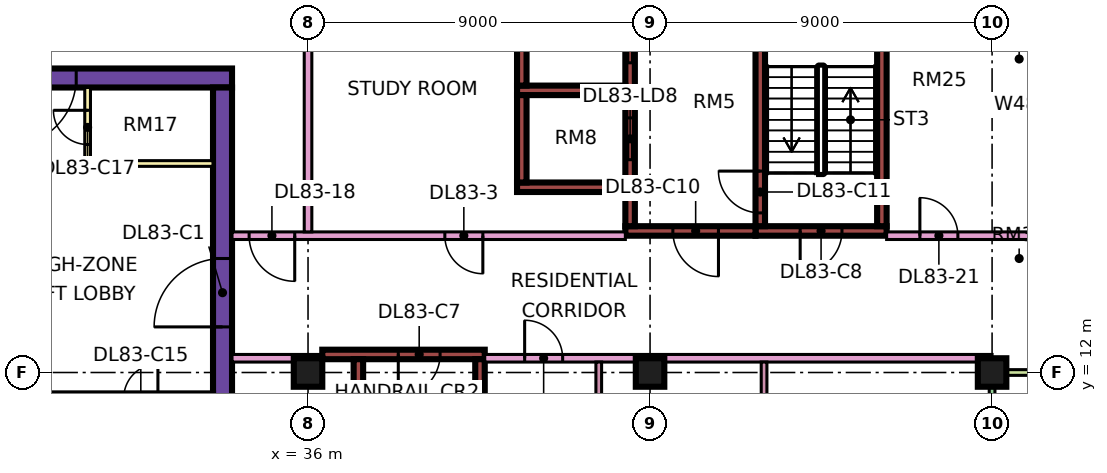
"""IFC4 building model, lengths in metres.
Left out: names, types, materials, properties, quantities, classifications, styles, units other than length and angle.
Written with IfcOpenShell. Run it as: python <this file> out.ifc"""

import sys

from ifc_helpers import new_model, si_unit, direction, frame, frame_2d, origin, origin_2d, place, context, subcontext, project, spatial, rectangle, extrude, element, fill, save


model = new_model("IFC4")
c1 = context("Model", 3, precision=1e-05, world=origin(), true_north=direction((0.0, 1.0)))
c2 = subcontext(c1, "Body", "Model", "MODEL_VIEW")
j1 = project(units=[si_unit("LENGTHUNIT", "METRE"), si_unit("PLANEANGLEUNIT", "RADIAN")], contexts=[c1])
p1 = place(None, origin())
s1 = spatial("IfcSite", under=j1, at=p1, CompositionType="ELEMENT")
p2 = place(p1, origin())
s2 = spatial("IfcBuilding", under=s1, at=p2, CompositionType="ELEMENT")
p3 = place(p2, frame((0.0, 0.0, 357.65)))
s3 = spatial("IfcBuildingStorey", under=s2, at=p3, CompositionType="ELEMENT", Elevation=357.65)
for number, where, z_axis, x_axis in (
    (1, (36.0, 12.0, 0.0), (0.0, 0.0, 1.0), (1.0, 0.0, 0.0)),
    (2, (45.0, 12.0, 0.0), (0.0, 0.0, 1.0), (1.0, 0.0, 0.0)),
    (3, (54.0, 12.0, 0.0), (0.0, 0.0, 1.0), (1.0, 0.0, 0.0)),
):
    element("IfcColumn", number, at=place(p3, frame(where, z_axis=z_axis, x_axis=x_axis)), inside=s3, PredefinedType="COLUMN", context=c2, shape_type="SweptSolid", body=[
        extrude(rectangle(XDim=0.75, YDim=0.75, at=origin_2d()), origin(), (0.0, 0.0, 1.0), 3.75),
    ])
p4 = place(p3, frame((9.0, 19.75, 0.0), z_axis=(0.0, 0.0, 1.0), x_axis=(1.0, 0.0, 0.0)))
e4 = element("IfcWall", 4, at=p4, inside=s3, PredefinedType="SHEAR", context=c2, shape_type="SweptSolid", body=[
    extrude(rectangle(XDim=25.0, YDim=0.5, at=frame_2d((12.5, 0.0))), origin(), (0.0, 0.0, 1.0), 3.75),
])
p5 = place(p4, frame((19.1, 0.0, 0.0)))
e5 = element("IfcOpeningElement", 5, at=p5, cuts=e4, PredefinedType="OPENING", context=c2, shape_type="SweptSolid", body=[
    extrude(rectangle(XDim=1.8, YDim=2.4, at=frame_2d((0.9, 1.2))), frame((0.0, 0.26, 0.0), z_axis=(0.0, -1.0, 0.0), x_axis=(1.0, 0.0, 0.0)), (0.0, 0.0, 1.0), 0.52),
])
p6 = place(p3, frame((33.75, 7.5, 0.0), z_axis=(0.0, 0.0, 1.0), x_axis=(0.0, 1.0, 0.0)))
e6 = element("IfcWall", 6, at=p6, inside=s3, PredefinedType="SHEAR", context=c2, shape_type="SweptSolid", body=[
    extrude(rectangle(XDim=12.0, YDim=0.5, at=frame_2d((6.0, 0.0))), origin(), (0.0, 0.0, 1.0), 3.75),
])
p7 = place(p6, frame((5.7, 0.0, 0.0)))
e7 = element("IfcOpeningElement", 7, at=p7, cuts=e6, PredefinedType="OPENING", context=c2, shape_type="SweptSolid", body=[
    extrude(rectangle(XDim=1.8, YDim=2.4, at=frame_2d((0.9, 1.2))), frame((0.0, 0.26, 0.0), z_axis=(0.0, -1.0, 0.0), x_axis=(1.0, 0.0, 0.0)), (0.0, 0.0, 1.0), 0.52),
])
p8 = place(p3, frame((36.375, 12.475, 0.0), z_axis=(0.0, 0.0, 1.0), x_axis=(1.0, 0.0, 0.0)))
e8 = element("IfcWall", 8, at=p8, inside=s3, PredefinedType="SHEAR", context=c2, shape_type="SweptSolid", body=[
    extrude(rectangle(XDim=4.275, YDim=0.25, at=frame_2d((2.137, 0.0))), origin(), (0.0, 0.0, 1.0), 3.75),
])
p9 = place(p8, frame((2.0, 0.0, 0.0)))
e9 = element("IfcOpeningElement", 9, at=p9, cuts=e8, PredefinedType="OPENING", context=c2, shape_type="SweptSolid", body=[
    extrude(rectangle(XDim=1.1, YDim=2.2, at=frame_2d((0.55, 1.1))), frame((0.0, 0.135, 0.0), z_axis=(0.0, -1.0, 0.0), x_axis=(1.0, 0.0, 0.0)), (0.0, 0.0, 1.0), 0.27),
])
for number, where, z_axis, x_axis in (
    (10, (37.325, 5.85, 0.0), (0.0, 0.0, 1.0), (0.0, 1.0, 0.0)),
    (11, (40.525, 5.85, 0.0), (0.0, 0.0, 1.0), (0.0, 1.0, 0.0)),
):
    element("IfcWall", number, at=place(p3, frame(where, z_axis=z_axis, x_axis=x_axis)), inside=s3, PredefinedType="SHEAR", context=c2, shape_type="SweptSolid", body=[
        extrude(rectangle(XDim=6.5, YDim=0.25, at=frame_2d((3.25, 0.0))), origin(), (0.0, 0.0, 1.0), 3.75),
    ])
p10 = place(p3, frame((47.775, 15.725, 0.0), z_axis=(0.0, 0.0, 1.0), x_axis=(1.0, 0.0, 0.0)))
e12 = element("IfcWall", 12, at=p10, inside=s3, PredefinedType="SHEAR", context=c2, shape_type="SweptSolid", body=[
    extrude(rectangle(XDim=3.45, YDim=0.25, at=frame_2d((1.725, 0.0))), origin(), (0.0, 0.0, 1.0), 3.75),
])
p11 = place(p10, frame((1.175, 0.0, 0.0)))
e13 = element("IfcOpeningElement", 13, at=p11, cuts=e12, PredefinedType="OPENING", context=c2, shape_type="SweptSolid", body=[
    extrude(rectangle(XDim=1.1, YDim=2.2, at=frame_2d((0.55, 1.1))), frame((0.0, 0.135, 0.0), z_axis=(0.0, -1.0, 0.0), x_axis=(1.0, 0.0, 0.0)), (0.0, 0.0, 1.0), 0.27),
])
p12 = place(p3, frame((47.9, 15.85, 0.0), z_axis=(0.0, 0.0, 1.0), x_axis=(0.0, 1.0, 0.0)))
e14 = element("IfcWall", 14, at=p12, inside=s3, PredefinedType="SHEAR", context=c2, shape_type="SweptSolid", body=[
    extrude(rectangle(XDim=6.5, YDim=0.25, at=frame_2d((3.25, 0.0))), origin(), (0.0, 0.0, 1.0), 3.75),
])
p13 = place(p12, frame((0.35, 0.0, 0.0)))
e15 = element("IfcOpeningElement", 15, at=p13, cuts=e14, PredefinedType="OPENING", context=c2, shape_type="SweptSolid", body=[
    extrude(rectangle(XDim=1.1, YDim=2.2, at=frame_2d((0.55, 1.1))), frame((0.0, 0.135, 0.0), z_axis=(0.0, -1.0, 0.0), x_axis=(1.0, 0.0, 0.0)), (0.0, 0.0, 1.0), 0.27),
])
p14 = place(p3, frame((51.1, 15.85, 0.0), z_axis=(0.0, 0.0, 1.0), x_axis=(0.0, 1.0, 0.0)))
e16 = element("IfcWall", 16, at=p14, inside=s3, PredefinedType="SHEAR", context=c2, shape_type="SweptSolid", body=[
    extrude(rectangle(XDim=6.5, YDim=0.25, at=frame_2d((3.25, 0.0))), origin(), (0.0, 0.0, 1.0), 3.75),
])
p15 = place(p3, frame((44.35, 15.725, 0.0), z_axis=(0.0, 0.0, 1.0), x_axis=(1.0, 0.0, 0.0)))
e17 = element("IfcWall", 17, at=p15, inside=s3, PredefinedType="SHEAR", context=c2, shape_type="SweptSolid", body=[
    extrude(rectangle(XDim=3.425, YDim=0.25, at=frame_2d((1.712, 0.0))), origin(), (0.0, 0.0, 1.0), 3.75),
])
p16 = place(p15, frame((1.25, 0.0, 0.0)))
e18 = element("IfcOpeningElement", 18, at=p16, cuts=e17, PredefinedType="OPENING", context=c2, shape_type="SweptSolid", body=[
    extrude(rectangle(XDim=1.2, YDim=2.2, at=frame_2d((0.6, 1.1))), frame((0.0, 0.135, 0.0), z_axis=(0.0, -1.0, 0.0), x_axis=(1.0, 0.0, 0.0)), (0.0, 0.0, 1.0), 0.27),
])
p17 = place(p3, frame((44.475, 15.85, 0.0), z_axis=(0.0, 0.0, 1.0), x_axis=(0.0, 1.0, 0.0)))
e19 = element("IfcWall", 19, at=p17, inside=s3, PredefinedType="SHEAR", context=c2, shape_type="SweptSolid", body=[
    extrude(rectangle(XDim=6.5, YDim=0.25, at=frame_2d((3.25, 0.0))), origin(), (0.0, 0.0, 1.0), 3.75),
])
p18 = place(p17, frame((1.75, 0.0, 0.0)))
e20 = element("IfcOpeningElement", 20, at=p18, cuts=e19, PredefinedType="OPENING", context=c2, shape_type="SweptSolid", body=[
    extrude(rectangle(XDim=1.1, YDim=2.2, at=frame_2d((0.55, 1.1))), frame((0.0, 0.135, 0.0), z_axis=(0.0, -1.0, 0.0), x_axis=(1.0, 0.0, 0.0)), (0.0, 0.0, 1.0), 0.27),
])
p19 = place(p17, frame((4.3, 0.0, 0.0)))
e21 = element("IfcOpeningElement", 21, at=p19, cuts=e19, PredefinedType="OPENING", context=c2, shape_type="SweptSolid", body=[
    extrude(rectangle(XDim=1.1, YDim=2.2, at=frame_2d((0.55, 1.1))), frame((0.0, 0.135, 0.0), z_axis=(0.0, -1.0, 0.0), x_axis=(1.0, 0.0, 0.0)), (0.0, 0.0, 1.0), 0.27),
])
for number, where, z_axis, x_axis in (
    (22, (41.5, 16.875, 0.0), (0.0, 0.0, 1.0), (1.0, 0.0, 0.0)),
    (23, (41.5, 19.425, 0.0), (0.0, 0.0, 1.0), (1.0, 0.0, 0.0)),
):
    element("IfcWall", number, at=place(p3, frame(where, z_axis=z_axis, x_axis=x_axis)), inside=s3, PredefinedType="SHEAR", context=c2, shape_type="SweptSolid", body=[
        extrude(rectangle(XDim=2.85, YDim=0.25, at=frame_2d((1.425, 0.0))), origin(), (0.0, 0.0, 1.0), 3.75),
    ])
for number, where, z_axis, x_axis in (
    (24, (41.625, 17.0, 0.0), (0.0, 0.0, 1.0), (0.0, 1.0, 0.0)),
    (25, (41.625, 19.55, 0.0), (0.0, 0.0, 1.0), (0.0, 1.0, 0.0)),
):
    element("IfcWall", number, at=place(p3, frame(where, z_axis=z_axis, x_axis=x_axis)), inside=s3, PredefinedType="SHEAR", context=c2, shape_type="SweptSolid", body=[
        extrude(rectangle(XDim=2.3, YDim=0.25, at=frame_2d((1.15, 0.0))), origin(), (0.0, 0.0, 1.0), 3.75),
    ])
p20 = place(p3, frame((54.0, 1.575, 0.0), z_axis=(0.0, 0.0, 1.0), x_axis=(0.0, 1.0, 0.0)))
e26 = element("IfcWall", 26, at=p20, inside=s3, PredefinedType="SOLIDWALL", context=c2, shape_type="SweptSolid", body=[
    extrude(rectangle(XDim=10.35, YDim=0.15, at=frame_2d((5.175, 0.0))), origin(), (0.0, 0.0, 1.0), 3.35),
])
p21 = place(p20, frame((0.663, 0.0, 0.0)))
e27 = element("IfcOpeningElement", 27, at=p21, cuts=e26, PredefinedType="OPENING", context=c2, shape_type="SweptSolid", body=[
    extrude(rectangle(XDim=1.8, YDim=2.4, at=frame_2d((0.9, 1.2))), frame((0.0, 0.085, 0.0), z_axis=(0.0, -1.0, 0.0), x_axis=(1.0, 0.0, 0.0)), (0.0, 0.0, 1.0), 0.17),
])
p22 = place(p20, frame((5.637, 0.0, 0.45)))
e28 = element("IfcOpeningElement", 28, at=p22, cuts=e26, PredefinedType="OPENING", context=c2, shape_type="SweptSolid", body=[
    extrude(rectangle(XDim=3.0, YDim=2.4, at=frame_2d((1.5, 1.2))), frame((0.0, 0.085, 0.0), z_axis=(0.0, -1.0, 0.0), x_axis=(1.0, 0.0, 0.0)), (0.0, 0.0, 1.0), 0.17),
])
p23 = place(p3, frame((55.5, 12.0, 0.0), z_axis=(0.0, 0.0, 1.0), x_axis=(-1.0, 0.0, 0.0)))
e29 = element("IfcWall", 29, at=p23, inside=s3, PredefinedType="SOLIDWALL", context=c2, shape_type="SweptSolid", body=[
    extrude(rectangle(XDim=1.5, YDim=0.15, at=frame_2d((0.75, 0.0))), origin(), (0.0, 0.0, 1.0), 3.35),
])
p24 = place(p3, frame((30.2, 17.5, 0.0), z_axis=(0.0, 0.0, 1.0), x_axis=(0.0, 1.0, 0.0)))
e30 = element("IfcWall", 30, at=p24, inside=s3, PredefinedType="PARTITIONING", context=c2, shape_type="SweptSolid", body=[
    extrude(rectangle(XDim=2.0, YDim=0.15, at=frame_2d((1.0, 0.0))), origin(), (0.0, 0.0, 1.0), 3.35),
])
p25 = place(p24, frame((0.5, 0.0, 0.0)))
e31 = element("IfcOpeningElement", 31, at=p25, cuts=e30, PredefinedType="OPENING", context=c2, shape_type="SweptSolid", body=[
    extrude(rectangle(XDim=0.9, YDim=2.1, at=frame_2d((0.45, 1.05))), frame((0.0, 0.085, 0.0), z_axis=(0.0, -1.0, 0.0), x_axis=(1.0, 0.0, 0.0)), (0.0, 0.0, 1.0), 0.17),
])
p26 = place(p3, frame((30.2, 17.5, 0.0), z_axis=(0.0, 0.0, 1.0), x_axis=(1.0, 0.0, 0.0)))
e32 = element("IfcWall", 32, at=p26, inside=s3, PredefinedType="PARTITIONING", context=c2, shape_type="SweptSolid", body=[
    extrude(rectangle(XDim=3.3, YDim=0.15, at=frame_2d((1.65, 0.0))), origin(), (0.0, 0.0, 1.0), 3.35),
])
p27 = place(p3, frame((34.0, 12.375, 0.0), z_axis=(0.0, 0.0, 1.0), x_axis=(1.0, 0.0, 0.0)))
e33 = element("IfcWall", 33, at=p27, inside=s3, PredefinedType="PARTITIONING", context=c2, shape_type="SweptSolid", body=[
    extrude(rectangle(XDim=2.376, YDim=0.2, at=frame_2d((1.188, 0.0))), origin(), (0.0, 0.0, 1.0), 3.35),
])
p28 = place(p3, frame((34.0, 15.6, 0.0), z_axis=(0.0, 0.0, 1.0), x_axis=(1.0, 0.0, 0.0)))
e34 = element("IfcWall", 34, at=p28, inside=s3, PredefinedType="PARTITIONING", context=c2, shape_type="SweptSolid", body=[
    extrude(rectangle(XDim=10.35, YDim=0.2, at=frame_2d((5.175, 0.0))), origin(), (0.0, 0.0, 1.0), 3.35),
])
p29 = place(p28, frame((5.6, 0.0, 0.0)))
e35 = element("IfcOpeningElement", 35, at=p29, cuts=e34, PredefinedType="OPENING", context=c2, shape_type="SweptSolid", body=[
    extrude(rectangle(XDim=1.0, YDim=2.1, at=frame_2d((0.5, 1.05))), frame((0.0, 0.11, 0.0), z_axis=(0.0, -1.0, 0.0), x_axis=(1.0, 0.0, 0.0)), (0.0, 0.0, 1.0), 0.22),
])
p30 = place(p28, frame((0.45, 0.0, 0.0)))
e36 = element("IfcOpeningElement", 36, at=p30, cuts=e34, PredefinedType="OPENING", context=c2, shape_type="SweptSolid", body=[
    extrude(rectangle(XDim=1.2, YDim=2.1, at=frame_2d((0.6, 1.05))), frame((0.0, 0.11, 0.0), z_axis=(0.0, -1.0, 0.0), x_axis=(1.0, 0.0, 0.0)), (0.0, 0.0, 1.0), 0.22),
])
p31 = place(p3, frame((36.0, 15.7, 0.0), z_axis=(0.0, 0.0, 1.0), x_axis=(0.0, 1.0, 0.0)))
e37 = element("IfcWall", 37, at=p31, inside=s3, PredefinedType="PARTITIONING", context=c2, shape_type="SweptSolid", body=[
    extrude(rectangle(XDim=8.3, YDim=0.2, at=frame_2d((4.15, 0.0))), origin(), (0.0, 0.0, 1.0), 3.35),
])
p32 = place(p3, frame((40.65, 12.375, 0.0), z_axis=(0.0, 0.0, 1.0), x_axis=(1.0, 0.0, 0.0)))
e38 = element("IfcWall", 38, at=p32, inside=s3, PredefinedType="PARTITIONING", context=c2, shape_type="SweptSolid", body=[
    extrude(rectangle(XDim=13.35, YDim=0.2, at=frame_2d((6.675, 0.0))), origin(), (0.0, 0.0, 1.0), 3.35),
])
p33 = place(p32, frame((1.05, 0.0, 0.0)))
e39 = element("IfcOpeningElement", 39, at=p33, cuts=e38, PredefinedType="OPENING", context=c2, shape_type="SweptSolid", body=[
    extrude(rectangle(XDim=1.0, YDim=2.1, at=frame_2d((0.5, 1.05))), frame((0.0, 0.11, 0.0), z_axis=(0.0, -1.0, 0.0), x_axis=(1.0, 0.0, 0.0)), (0.0, 0.0, 1.0), 0.22),
])
p34 = place(p3, frame((43.65, 5.975, 0.0), z_axis=(0.0, 0.0, 1.0), x_axis=(0.0, 1.0, 0.0)))
e40 = element("IfcWall", 40, at=p34, inside=s3, PredefinedType="PARTITIONING", context=c2, shape_type="SweptSolid", body=[
    extrude(rectangle(XDim=6.3, YDim=0.15, at=frame_2d((3.15, 0.0))), origin(), (0.0, 0.0, 1.0), 3.35),
])
p35 = place(p34, frame((4.275, 0.0, 0.0)))
e41 = element("IfcOpeningElement", 41, at=p35, cuts=e40, PredefinedType="OPENING", context=c2, shape_type="SweptSolid", body=[
    extrude(rectangle(XDim=0.9, YDim=2.1, at=frame_2d((0.45, 1.05))), frame((0.0, 0.085, 0.0), z_axis=(0.0, -1.0, 0.0), x_axis=(1.0, 0.0, 0.0)), (0.0, 0.0, 1.0), 0.17),
])
p36 = place(p3, frame((48.0, 5.975, 0.0), z_axis=(0.0, 0.0, 1.0), x_axis=(0.0, 1.0, 0.0)))
e42 = element("IfcWall", 42, at=p36, inside=s3, PredefinedType="PARTITIONING", context=c2, shape_type="SweptSolid", body=[
    extrude(rectangle(XDim=6.3, YDim=0.15, at=frame_2d((3.15, 0.0))), origin(), (0.0, 0.0, 1.0), 3.35),
])
p37 = place(p3, frame((51.225, 15.6, 0.0), z_axis=(0.0, 0.0, 1.0), x_axis=(1.0, 0.0, 0.0)))
e43 = element("IfcWall", 43, at=p37, inside=s3, PredefinedType="PARTITIONING", context=c2, shape_type="SweptSolid", body=[
    extrude(rectangle(XDim=4.125, YDim=0.2, at=frame_2d((2.062, 0.0))), origin(), (0.0, 0.0, 1.0), 3.35),
])
p38 = place(p37, frame((0.875, 0.0, 0.0)))
e44 = element("IfcOpeningElement", 44, at=p38, cuts=e43, PredefinedType="OPENING", context=c2, shape_type="SweptSolid", body=[
    extrude(rectangle(XDim=1.0, YDim=2.1, at=frame_2d((0.5, 1.05))), frame((0.0, 0.11, 0.0), z_axis=(0.0, -1.0, 0.0), x_axis=(1.0, 0.0, 0.0)), (0.0, 0.0, 1.0), 0.22),
])
p39 = place(p7, origin())
e45 = element("IfcDoor", 45, at=p39, inside=s3, OperationType="DOUBLE_DOOR_SINGLE_SWING", PredefinedType="DOOR", context=c2, shape_type="SweptSolid", body=[
    extrude(rectangle(XDim=1.8, YDim=2.4, at=frame_2d((0.9, 1.2))), frame((0.0, 0.025, 0.0), z_axis=(0.0, -1.0, 0.0), x_axis=(1.0, 0.0, 0.0)), (0.0, 0.0, 1.0), 0.05),
])
fill(e7, e45)
p40 = place(p5, frame((1.8, 0.0, 0.0), z_axis=(0.0, 0.0, 1.0), x_axis=(-1.0, 0.0, 0.0)))
e46 = element("IfcDoor", 46, at=p40, inside=s3, OperationType="DOUBLE_DOOR_SINGLE_SWING", PredefinedType="DOOR", context=c2, shape_type="SweptSolid", body=[
    extrude(rectangle(XDim=1.8, YDim=2.4, at=frame_2d((0.9, 1.2))), frame((0.0, 0.025, 0.0), z_axis=(0.0, -1.0, 0.0), x_axis=(1.0, 0.0, 0.0)), (0.0, 0.0, 1.0), 0.05),
])
fill(e5, e46)
p41 = place(p9, frame((1.1, 0.0, 0.0), z_axis=(0.0, 0.0, 1.0), x_axis=(-1.0, 0.0, 0.0)))
e47 = element("IfcDoor", 47, at=p41, inside=s3, OperationType="SINGLE_SWING_LEFT", PredefinedType="DOOR", context=c2, shape_type="SweptSolid", body=[
    extrude(rectangle(XDim=1.1, YDim=2.2, at=frame_2d((0.55, 1.1))), frame((0.0, 0.025, 0.0), z_axis=(0.0, -1.0, 0.0), x_axis=(1.0, 0.0, 0.0)), (0.0, 0.0, 1.0), 0.05),
])
fill(e9, e47)
p42 = place(p11, frame((1.1, 0.0, 0.0), z_axis=(0.0, 0.0, 1.0), x_axis=(-1.0, 0.0, 0.0)))
e48 = element("IfcDoor", 48, at=p42, inside=s3, OperationType="SINGLE_SWING_LEFT", PredefinedType="DOOR", context=c2, shape_type="SweptSolid", body=[
    extrude(rectangle(XDim=1.1, YDim=2.2, at=frame_2d((0.55, 1.1))), frame((0.0, 0.025, 0.0), z_axis=(0.0, -1.0, 0.0), x_axis=(1.0, 0.0, 0.0)), (0.0, 0.0, 1.0), 0.05),
])
fill(e13, e48)
p43 = place(p16, origin())
e49 = element("IfcDoor", 49, at=p43, inside=s3, OperationType="SINGLE_SWING_RIGHT", PredefinedType="DOOR", context=c2, shape_type="SweptSolid", body=[
    extrude(rectangle(XDim=1.2, YDim=2.2, at=frame_2d((0.6, 1.1))), frame((0.0, 0.025, 0.0), z_axis=(0.0, -1.0, 0.0), x_axis=(1.0, 0.0, 0.0)), (0.0, 0.0, 1.0), 0.05),
])
fill(e18, e49)
p44 = place(p13, frame((1.1, 0.0, 0.0), z_axis=(0.0, 0.0, 1.0), x_axis=(-1.0, 0.0, 0.0)))
e50 = element("IfcDoor", 50, at=p44, inside=s3, OperationType="SINGLE_SWING_RIGHT", PredefinedType="DOOR", context=c2, shape_type="SweptSolid", body=[
    extrude(rectangle(XDim=1.1, YDim=2.2, at=frame_2d((0.55, 1.1))), frame((0.0, 0.025, 0.0), z_axis=(0.0, -1.0, 0.0), x_axis=(1.0, 0.0, 0.0)), (0.0, 0.0, 1.0), 0.05),
])
fill(e15, e50)
p45 = place(p18, origin())
e51 = element("IfcDoor", 51, at=p45, inside=s3, OperationType="DOUBLE_DOOR_SLIDING", PredefinedType="DOOR", context=c2, shape_type="SweptSolid", body=[
    extrude(rectangle(XDim=1.1, YDim=2.2, at=frame_2d((0.55, 1.1))), frame((0.0, 0.025, 0.0), z_axis=(0.0, -1.0, 0.0), x_axis=(1.0, 0.0, 0.0)), (0.0, 0.0, 1.0), 0.05),
])
fill(e20, e51)
p46 = place(p19, origin())
e52 = element("IfcDoor", 52, at=p46, inside=s3, OperationType="DOUBLE_DOOR_SLIDING", PredefinedType="DOOR", context=c2, shape_type="SweptSolid", body=[
    extrude(rectangle(XDim=1.1, YDim=2.2, at=frame_2d((0.55, 1.1))), frame((0.0, 0.025, 0.0), z_axis=(0.0, -1.0, 0.0), x_axis=(1.0, 0.0, 0.0)), (0.0, 0.0, 1.0), 0.05),
])
fill(e21, e52)
p47 = place(p25, frame((0.9, 0.0, 0.0), z_axis=(0.0, 0.0, 1.0), x_axis=(-1.0, 0.0, 0.0)))
e53 = element("IfcDoor", 53, at=p47, inside=s3, OperationType="SINGLE_SWING_RIGHT", PredefinedType="DOOR", context=c2, shape_type="SweptSolid", body=[
    extrude(rectangle(XDim=0.9, YDim=2.1, at=frame_2d((0.45, 1.05))), frame((0.0, 0.025, 0.0), z_axis=(0.0, -1.0, 0.0), x_axis=(1.0, 0.0, 0.0)), (0.0, 0.0, 1.0), 0.05),
])
fill(e31, e53)
p48 = place(p29, origin())
e54 = element("IfcDoor", 54, at=p48, inside=s3, OperationType="SINGLE_SWING_RIGHT", PredefinedType="DOOR", context=c2, shape_type="SweptSolid", body=[
    extrude(rectangle(XDim=1.0, YDim=2.1, at=frame_2d((0.5, 1.05))), frame((0.0, 0.025, 0.0), z_axis=(0.0, -1.0, 0.0), x_axis=(1.0, 0.0, 0.0)), (0.0, 0.0, 1.0), 0.05),
])
fill(e35, e54)
p49 = place(p30, origin())
e55 = element("IfcDoor", 55, at=p49, inside=s3, OperationType="SINGLE_SWING_RIGHT", PredefinedType="DOOR", context=c2, shape_type="SweptSolid", body=[
    extrude(rectangle(XDim=1.2, YDim=2.1, at=frame_2d((0.6, 1.05))), frame((0.0, 0.025, 0.0), z_axis=(0.0, -1.0, 0.0), x_axis=(1.0, 0.0, 0.0)), (0.0, 0.0, 1.0), 0.05),
])
fill(e36, e55)
p50 = place(p38, origin())
e56 = element("IfcDoor", 56, at=p50, inside=s3, OperationType="SINGLE_SWING_LEFT", PredefinedType="DOOR", context=c2, shape_type="SweptSolid", body=[
    extrude(rectangle(XDim=1.0, YDim=2.1, at=frame_2d((0.5, 1.05))), frame((0.0, 0.025, 0.0), z_axis=(0.0, -1.0, 0.0), x_axis=(1.0, 0.0, 0.0)), (0.0, 0.0, 1.0), 0.05),
])
fill(e44, e56)
p51 = place(p33, origin())
e57 = element("IfcDoor", 57, at=p51, inside=s3, OperationType="SINGLE_SWING_LEFT", PredefinedType="DOOR", context=c2, shape_type="SweptSolid", body=[
    extrude(rectangle(XDim=1.0, YDim=2.1, at=frame_2d((0.5, 1.05))), frame((0.0, 0.025, 0.0), z_axis=(0.0, -1.0, 0.0), x_axis=(1.0, 0.0, 0.0)), (0.0, 0.0, 1.0), 0.05),
])
fill(e39, e57)
save(model, sys.argv[1])
